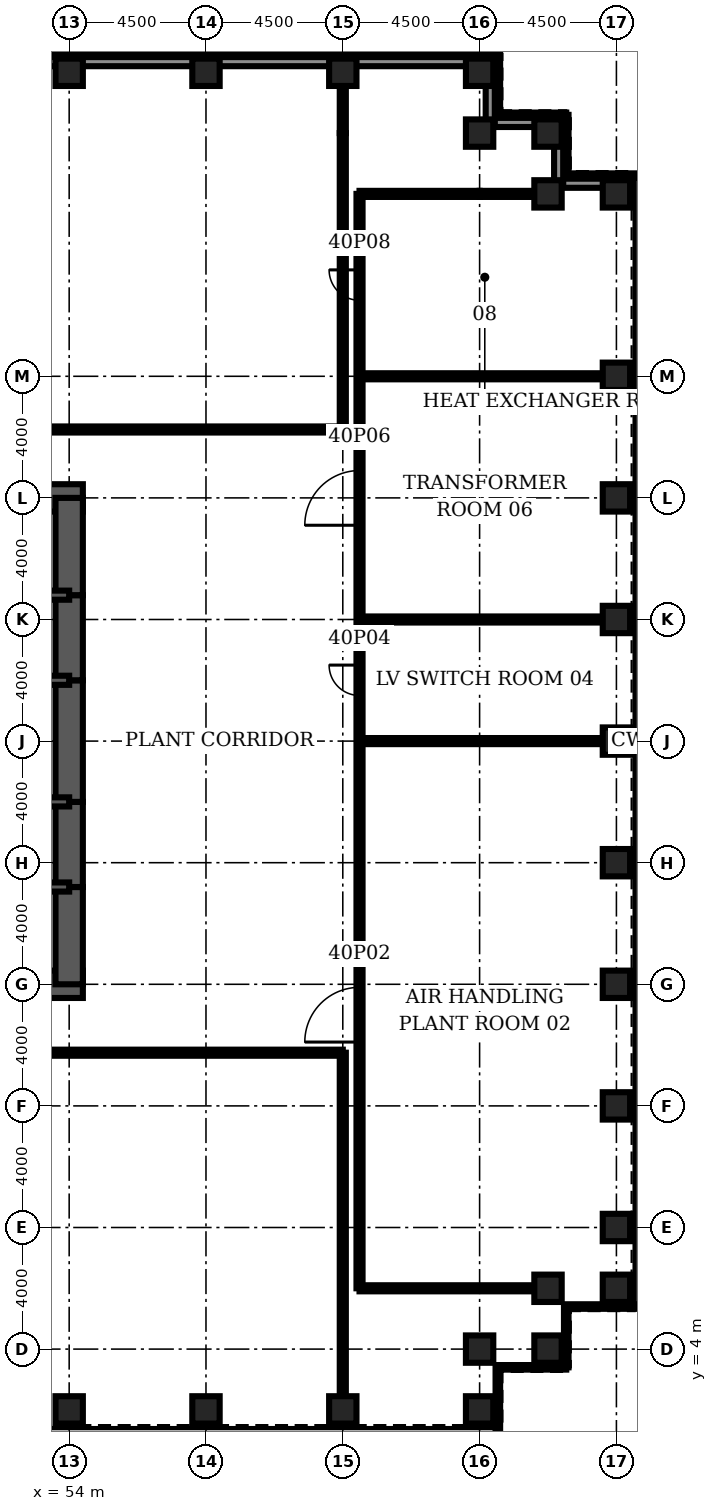
"""IFC4 building model, lengths in metres.
Left out: names, types, materials, properties, quantities, classifications, styles, units other than length and angle.
Written with IfcOpenShell. Run it as: python <this file> out.ifc"""

import sys

from ifc_helpers import new_model, si_unit, direction, frame, frame_2d, origin, origin_2d, place, context, subcontext, project, spatial, rectangle, hollow_rectangle, extrude, element, fill, save


model = new_model("IFC4")
c1 = context("Model", 3, precision=1e-05, world=origin(), true_north=direction((0.0, 1.0)))
c2 = subcontext(c1, "Body", "Model", "MODEL_VIEW")
j1 = project(units=[si_unit("LENGTHUNIT", "METRE"), si_unit("PLANEANGLEUNIT", "RADIAN")], contexts=[c1])
p1 = place(None, origin())
s1 = spatial("IfcSite", under=j1, at=p1, CompositionType="ELEMENT")
p2 = place(p1, origin())
s2 = spatial("IfcBuilding", under=s1, at=p2, CompositionType="ELEMENT")
p3 = place(p2, frame((0.0, 0.0, 180.3)))
s3 = spatial("IfcBuildingStorey", under=s2, at=p3, CompositionType="ELEMENT", Elevation=180.3)
for number, where, z_axis, x_axis in (
    (1, (54.0, 2.0, 0.0), (0.0, 0.0, 1.0), (0.0, 1.0, 0.0)),
    (2, (58.5, 2.0, 0.0), (0.0, 0.0, 1.0), (0.0, 1.0, 0.0)),
    (3, (63.0, 2.0, 0.0), (0.0, 0.0, 1.0), (0.0, 1.0, 0.0)),
    (4, (67.5, 2.0, 0.0), (0.0, 0.0, 1.0), (0.0, 1.0, 0.0)),
    (5, (67.5, 4.0, 0.0), (0.0, 0.0, 1.0), (0.0, 1.0, 0.0)),
    (6, (69.75, 4.0, 0.0), (0.0, 0.0, 1.0), (1.0, 0.0, 0.0)),
    (7, (69.75, 6.0, 0.0), (0.0, 0.0, 1.0), (1.0, 0.0, 0.0)),
    (8, (72.0, 6.0, 0.0), (0.0, 0.0, 1.0), (1.0, 0.0, 0.0)),
    (9, (72.0, 8.0, 0.0), (0.0, 0.0, 1.0), (1.0, 0.0, 0.0)),
    (10, (72.0, 12.0, 0.0), (0.0, 0.0, 1.0), (1.0, 0.0, 0.0)),
    (11, (72.0, 16.0, 0.0), (0.0, 0.0, 1.0), (1.0, 0.0, 0.0)),
    (12, (72.0, 20.0, 0.0), (0.0, 0.0, 1.0), (1.0, 0.0, 0.0)),
    (13, (72.0, 24.0, 0.0), (0.0, 0.0, 1.0), (1.0, 0.0, 0.0)),
    (14, (72.0, 28.0, 0.0), (0.0, 0.0, 1.0), (1.0, 0.0, 0.0)),
    (15, (72.0, 32.0, 0.0), (0.0, 0.0, 1.0), (1.0, 0.0, 0.0)),
    (16, (72.0, 36.0, 0.0), (0.0, 0.0, 1.0), (1.0, 0.0, 0.0)),
):
    element("IfcColumn", number, at=place(p3, frame(where, z_axis=z_axis, x_axis=x_axis)), inside=s3, PredefinedType="COLUMN", context=c2, shape_type="SweptSolid", body=[
        extrude(hollow_rectangle(XDim=0.9, YDim=0.9, WallThickness=0.09, at=origin_2d()), origin(), (0.0, 0.0, 1.0), 5.5),
    ])
for number, where, z_axis, x_axis in (
    (17, (72.0, 41.944, 0.155), (0.0, -0.342, 0.94), (1.0, 0.0, 0.0)),
    (18, (69.75, 41.944, 0.155), (0.0, -0.342, 0.94), (1.0, 0.0, 0.0)),
    (19, (69.75, 43.944, 0.155), (0.0, -0.342, 0.94), (1.0, 0.0, 0.0)),
    (20, (67.5, 43.944, 0.155), (0.0, -0.342, 0.94), (0.0, 0.94, 0.342)),
    (21, (67.5, 45.944, 0.155), (0.0, -0.342, 0.94), (0.0, 0.94, 0.342)),
    (22, (63.0, 45.944, 0.155), (0.0, -0.342, 0.94), (0.0, 0.94, 0.342)),
    (23, (58.5, 45.944, 0.155), (0.0, -0.342, 0.94), (0.0, 0.94, 0.342)),
    (24, (54.0, 45.944, 0.155), (0.0, -0.342, 0.94), (0.0, 0.94, 0.342)),
):
    element("IfcColumn", number, at=place(p3, frame(where, z_axis=z_axis, x_axis=x_axis)), inside=s3, PredefinedType="USERDEFINED", context=c2, shape_type="SweptSolid", body=[
        extrude(hollow_rectangle(XDim=0.9, YDim=0.9, WallThickness=0.09, at=origin_2d()), origin(), (0.0, 0.0, 1.0), 5.522),
    ])
for number, where, z_axis, x_axis in (
    (25, (45.0, 16.0, 0.0), (0.0, 0.0, 1.0), (1.0, 0.0, 0.0)),
    (26, (54.45, 32.0, 0.0), (0.0, 0.0, 1.0), (-1.0, 0.0, 0.0)),
):
    element("IfcWall", number, at=place(p3, frame(where, z_axis=z_axis, x_axis=x_axis)), inside=s3, PredefinedType="SHEAR", context=c2, shape_type="SweptSolid", body=[
        extrude(rectangle(XDim=9.45, YDim=0.9, at=frame_2d((4.725, 0.0))), origin(), (0.0, 0.0, 1.0), 5.5),
    ])
p4 = place(p3, frame((54.0, 16.0, 0.0), z_axis=(0.0, 0.0, 1.0), x_axis=(0.0, 1.0, 0.0)))
e27 = element("IfcWall", 27, at=p4, inside=s3, PredefinedType="SHEAR", context=c2, shape_type="SweptSolid", body=[
    extrude(rectangle(XDim=3.2, YDim=0.9, at=frame_2d((1.6, 0.0))), origin(), (0.0, 0.0, 1.0), 5.5),
])
p5 = place(p3, frame((54.0, 19.2, 0.0), z_axis=(0.0, 0.0, 1.0), x_axis=(0.0, 1.0, 0.0)))
e28 = element("IfcWall", 28, at=p5, inside=s3, PredefinedType="SHEAR", context=c2, shape_type="SweptSolid", body=[
    extrude(rectangle(XDim=2.8, YDim=0.9, at=frame_2d((1.4, 0.0))), origin(), (0.0, 0.0, 1.0), 5.5),
])
p6 = place(p5, frame((0.4, 0.0, 0.0)))
e29 = element("IfcOpeningElement", 29, at=p6, cuts=e28, PredefinedType="OPENING", context=c2, shape_type="SweptSolid", body=[
    extrude(rectangle(XDim=1.8, YDim=2.1, at=frame_2d((0.9, 1.05))), frame((0.0, 0.46, 0.0), z_axis=(0.0, -1.0, 0.0), x_axis=(1.0, 0.0, 0.0)), (0.0, 0.0, 1.0), 0.92),
])
p7 = place(p3, frame((54.0, 22.0, 0.0), z_axis=(0.0, 0.0, 1.0), x_axis=(0.0, 1.0, 0.0)))
e30 = element("IfcWall", 30, at=p7, inside=s3, PredefinedType="SHEAR", context=c2, shape_type="SweptSolid", body=[
    extrude(rectangle(XDim=4.0, YDim=0.9, at=frame_2d((2.0, 0.0))), origin(), (0.0, 0.0, 1.0), 5.5),
])
p8 = place(p3, frame((54.0, 26.0, 0.0), z_axis=(0.0, 0.0, 1.0), x_axis=(0.0, 1.0, 0.0)))
e31 = element("IfcWall", 31, at=p8, inside=s3, PredefinedType="SHEAR", context=c2, shape_type="SweptSolid", body=[
    extrude(rectangle(XDim=2.8, YDim=0.9, at=frame_2d((1.4, 0.0))), origin(), (0.0, 0.0, 1.0), 5.5),
])
p9 = place(p8, frame((0.6, 0.0, 0.0)))
e32 = element("IfcOpeningElement", 32, at=p9, cuts=e31, PredefinedType="OPENING", context=c2, shape_type="SweptSolid", body=[
    extrude(rectangle(XDim=1.8, YDim=2.1, at=frame_2d((0.9, 1.05))), frame((0.0, 0.46, 0.0), z_axis=(0.0, -1.0, 0.0), x_axis=(1.0, 0.0, 0.0)), (0.0, 0.0, 1.0), 0.92),
])
p10 = place(p3, frame((54.0, 28.8, 0.0), z_axis=(0.0, 0.0, 1.0), x_axis=(0.0, 1.0, 0.0)))
e33 = element("IfcWall", 33, at=p10, inside=s3, PredefinedType="SHEAR", context=c2, shape_type="SweptSolid", body=[
    extrude(rectangle(XDim=3.2, YDim=0.9, at=frame_2d((1.6, 0.0))), origin(), (0.0, 0.0, 1.0), 5.5),
])
p11 = place(p3, frame((45.0, 19.2, 0.0), z_axis=(0.0, 0.0, 1.0), x_axis=(1.0, 0.0, 0.0)))
e34 = element("IfcWall", 34, at=p11, inside=s3, PredefinedType="SOLIDWALL", context=c2, shape_type="SweptSolid", body=[
    extrude(rectangle(XDim=9.0, YDim=0.3, at=frame_2d((4.5, 0.0))), origin(), (0.0, 0.0, 1.0), 5.5),
])
p12 = place(p11, frame((7.35, 0.0, 0.0)))
e35 = element("IfcOpeningElement", 35, at=p12, cuts=e34, PredefinedType="OPENING", context=c2, shape_type="SweptSolid", body=[
    extrude(rectangle(XDim=1.0, YDim=2.1, at=frame_2d((0.5, 1.05))), frame((0.0, 0.16, 0.0), z_axis=(0.0, -1.0, 0.0), x_axis=(1.0, 0.0, 0.0)), (0.0, 0.0, 1.0), 0.32),
])
p13 = place(p3, frame((45.0, 28.8, 0.0), z_axis=(0.0, 0.0, 1.0), x_axis=(1.0, 0.0, 0.0)))
e36 = element("IfcWall", 36, at=p13, inside=s3, PredefinedType="SOLIDWALL", context=c2, shape_type="SweptSolid", body=[
    extrude(rectangle(XDim=9.0, YDim=0.3, at=frame_2d((4.5, 0.0))), origin(), (0.0, 0.0, 1.0), 5.5),
])
p14 = place(p13, frame((7.35, 0.0, 0.0)))
e37 = element("IfcOpeningElement", 37, at=p14, cuts=e36, PredefinedType="OPENING", context=c2, shape_type="SweptSolid", body=[
    extrude(rectangle(XDim=1.0, YDim=2.1, at=frame_2d((0.5, 1.05))), frame((0.0, 0.16, 0.0), z_axis=(0.0, -1.0, 0.0), x_axis=(1.0, 0.0, 0.0)), (0.0, 0.0, 1.0), 0.32),
])
p15 = place(p3, frame((48.0, 22.0, 0.0), z_axis=(0.0, 0.0, 1.0), x_axis=(1.0, 0.0, 0.0)))
e38 = element("IfcWall", 38, at=p15, inside=s3, PredefinedType="SOLIDWALL", context=c2, shape_type="SweptSolid", body=[
    extrude(rectangle(XDim=6.0, YDim=0.3, at=frame_2d((3.0, 0.0))), origin(), (0.0, 0.0, 1.0), 5.5),
])
p16 = place(p15, frame((2.0, 0.0, 0.0)))
e39 = element("IfcOpeningElement", 39, at=p16, cuts=e38, PredefinedType="OPENING", context=c2, shape_type="SweptSolid", body=[
    extrude(rectangle(XDim=1.0, YDim=2.1, at=frame_2d((0.5, 1.05))), frame((0.0, 0.16, 0.0), z_axis=(0.0, -1.0, 0.0), x_axis=(1.0, 0.0, 0.0)), (0.0, 0.0, 1.0), 0.32),
])
p17 = place(p15, frame((4.3, 0.0, 0.0)))
e40 = element("IfcOpeningElement", 40, at=p17, cuts=e38, PredefinedType="OPENING", context=c2, shape_type="SweptSolid", body=[
    extrude(rectangle(XDim=1.0, YDim=2.1, at=frame_2d((0.5, 1.05))), frame((0.0, 0.16, 0.0), z_axis=(0.0, -1.0, 0.0), x_axis=(1.0, 0.0, 0.0)), (0.0, 0.0, 1.0), 0.32),
])
p18 = place(p3, frame((48.0, 26.0, 0.0), z_axis=(0.0, 0.0, 1.0), x_axis=(1.0, 0.0, 0.0)))
e41 = element("IfcWall", 41, at=p18, inside=s3, PredefinedType="SOLIDWALL", context=c2, shape_type="SweptSolid", body=[
    extrude(rectangle(XDim=6.0, YDim=0.3, at=frame_2d((3.0, 0.0))), origin(), (0.0, 0.0, 1.0), 5.5),
])
p19 = place(p3, frame((63.55, 6.0, 0.0), z_axis=(0.0, 0.0, 1.0), x_axis=(1.0, 0.0, 0.0)))
e42 = element("IfcWall", 42, at=p19, inside=s3, PredefinedType="PARTITIONING", context=c2, shape_type="SweptSolid", body=[
    extrude(rectangle(XDim=5.75, YDim=0.2, at=frame_2d((2.875, 0.0))), origin(), (0.0, 0.0, 1.0), 5.34),
])
p20 = place(p3, frame((9.0, 13.75, 0.0), z_axis=(0.0, 0.0, 1.0), x_axis=(1.0, 0.0, 0.0)))
e43 = element("IfcWall", 43, at=p20, inside=s3, PredefinedType="PARTITIONING", context=c2, shape_type="SweptSolid", body=[
    extrude(rectangle(XDim=54.0, YDim=0.2, at=frame_2d((27.0, 0.0))), origin(), (0.0, 0.0, 1.0), 5.34),
])
p21 = place(p20, frame((26.1, 0.0, 0.0)))
e44 = element("IfcOpeningElement", 44, at=p21, cuts=e43, PredefinedType="OPENING", context=c2, shape_type="SweptSolid", body=[
    extrude(rectangle(XDim=1.8, YDim=2.1, at=frame_2d((0.9, 1.05))), frame((0.0, 0.11, 0.0), z_axis=(0.0, -1.0, 0.0), x_axis=(1.0, 0.0, 0.0)), (0.0, 0.0, 1.0), 0.22),
])
for number, where, z_axis, x_axis in (
    (45, (63.55, 24.0, 0.0), (0.0, 0.0, 1.0), (1.0, 0.0, 0.0)),
    (46, (63.55, 28.0, 0.0), (0.0, 0.0, 1.0), (1.0, 0.0, 0.0)),
):
    element("IfcWall", number, at=place(p3, frame(where, z_axis=z_axis, x_axis=x_axis)), inside=s3, PredefinedType="PARTITIONING", context=c2, shape_type="SweptSolid", body=[
        extrude(rectangle(XDim=8.0, YDim=0.2, at=frame_2d((4.0, 0.0))), origin(), (0.0, 0.0, 1.0), 5.34),
    ])
p22 = place(p3, frame((9.0, 34.25, 0.0), z_axis=(0.0, 0.0, 1.0), x_axis=(1.0, 0.0, 0.0)))
e47 = element("IfcWall", 47, at=p22, inside=s3, PredefinedType="PARTITIONING", context=c2, shape_type="SweptSolid", body=[
    extrude(rectangle(XDim=54.0, YDim=0.2, at=frame_2d((27.0, 0.0))), origin(), (0.0, 0.0, 1.0), 5.34),
])
p23 = place(p22, frame((26.1, 0.0, 0.0)))
e48 = element("IfcOpeningElement", 48, at=p23, cuts=e47, PredefinedType="OPENING", context=c2, shape_type="SweptSolid", body=[
    extrude(rectangle(XDim=1.8, YDim=2.1, at=frame_2d((0.9, 1.05))), frame((0.0, 0.11, 0.0), z_axis=(0.0, -1.0, 0.0), x_axis=(1.0, 0.0, 0.0)), (0.0, 0.0, 1.0), 0.22),
])
p24 = place(p3, frame((63.55, 36.0, 0.0), z_axis=(0.0, 0.0, 1.0), x_axis=(1.0, 0.0, 0.0)))
e49 = element("IfcWall", 49, at=p24, inside=s3, PredefinedType="PARTITIONING", context=c2, shape_type="SweptSolid", body=[
    extrude(rectangle(XDim=8.0, YDim=0.2, at=frame_2d((4.0, 0.0))), origin(), (0.0, 0.0, 1.0), 5.34),
])
p25 = place(p3, frame((63.55, 42.0, 0.0), z_axis=(0.0, 0.0, 1.0), x_axis=(1.0, 0.0, 0.0)))
e50 = element("IfcWall", 50, at=p25, inside=s3, PredefinedType="PARTITIONING", context=c2, shape_type="SweptSolid", body=[
    extrude(rectangle(XDim=3.95, YDim=0.2, at=frame_2d((1.975, 0.0))), origin(), (0.0, 0.0, 1.0), 5.34),
])
p26 = place(p3, frame((67.5, 42.0, 0.0), z_axis=(0.0, 0.0, 1.0), x_axis=(1.0, 0.0, 0.0)))
e51 = element("IfcWall", 51, at=p26, inside=s3, PredefinedType="PARTITIONING", context=c2, shape_type="SweptSolid", body=[
    extrude(rectangle(XDim=1.8, YDim=0.2, at=frame_2d((0.9, 0.0))), origin(), (0.0, 0.0, 1.0), 4.64),
])
p27 = place(p3, frame((63.0, 2.45, 0.0), z_axis=(0.0, 0.0, 1.0), x_axis=(0.0, 1.0, 0.0)))
e52 = element("IfcWall", 52, at=p27, inside=s3, PredefinedType="PARTITIONING", context=c2, shape_type="SweptSolid", body=[
    extrude(rectangle(XDim=11.3, YDim=0.2, at=frame_2d((5.65, 0.0))), origin(), (0.0, 0.0, 1.0), 5.34),
])
p28 = place(p3, frame((63.0, 34.25, 0.0), z_axis=(0.0, 0.0, 1.0), x_axis=(0.0, 1.0, 0.0)))
e53 = element("IfcWall", 53, at=p28, inside=s3, PredefinedType="PARTITIONING", context=c2, shape_type="SweptSolid", body=[
    extrude(rectangle(XDim=9.75, YDim=0.2, at=frame_2d((4.875, 0.0))), origin(), (0.0, 0.0, 1.0), 5.25),
])
p29 = place(p3, frame((63.0, 44.0, 0.0), z_axis=(0.0, 0.0, 1.0), x_axis=(0.0, 1.0, 0.0)))
e54 = element("IfcWall", 54, at=p29, inside=s3, PredefinedType="PARTITIONING", context=c2, shape_type="SweptSolid", body=[
    extrude(rectangle(XDim=1.55, YDim=0.2, at=frame_2d((0.775, 0.0))), origin(), (0.0, 0.0, 1.0), 4.726),
])
p30 = place(p3, frame((63.55, 6.0, 0.0), z_axis=(0.0, 0.0, 1.0), x_axis=(0.0, 1.0, 0.0)))
e55 = element("IfcWall", 55, at=p30, inside=s3, PredefinedType="PARTITIONING", context=c2, shape_type="SweptSolid", body=[
    extrude(rectangle(XDim=36.0, YDim=0.2, at=frame_2d((18.0, 0.0))), origin(), (0.0, 0.0, 1.0), 5.34),
])
p31 = place(p30, frame((8.1, 0.0, 0.0)))
e56 = element("IfcOpeningElement", 56, at=p31, cuts=e55, PredefinedType="OPENING", context=c2, shape_type="SweptSolid", body=[
    extrude(rectangle(XDim=1.8, YDim=2.1, at=frame_2d((0.9, 1.05))), frame((0.0, 0.11, 0.0), z_axis=(0.0, -1.0, 0.0), x_axis=(1.0, 0.0, 0.0)), (0.0, 0.0, 1.0), 0.22),
])
p32 = place(p30, frame((19.5, 0.0, 0.0)))
e57 = element("IfcOpeningElement", 57, at=p32, cuts=e55, PredefinedType="OPENING", context=c2, shape_type="SweptSolid", body=[
    extrude(rectangle(XDim=1.0, YDim=2.1, at=frame_2d((0.5, 1.05))), frame((0.0, 0.11, 0.0), z_axis=(0.0, -1.0, 0.0), x_axis=(1.0, 0.0, 0.0)), (0.0, 0.0, 1.0), 0.22),
])
p33 = place(p30, frame((25.1, 0.0, 0.0)))
e58 = element("IfcOpeningElement", 58, at=p33, cuts=e55, PredefinedType="OPENING", context=c2, shape_type="SweptSolid", body=[
    extrude(rectangle(XDim=1.8, YDim=2.1, at=frame_2d((0.9, 1.05))), frame((0.0, 0.11, 0.0), z_axis=(0.0, -1.0, 0.0), x_axis=(1.0, 0.0, 0.0)), (0.0, 0.0, 1.0), 0.22),
])
p34 = place(p30, frame((32.5, 0.0, 0.0)))
e59 = element("IfcOpeningElement", 59, at=p34, cuts=e55, PredefinedType="OPENING", context=c2, shape_type="SweptSolid", body=[
    extrude(rectangle(XDim=1.0, YDim=2.1, at=frame_2d((0.5, 1.05))), frame((0.0, 0.11, 0.0), z_axis=(0.0, -1.0, 0.0), x_axis=(1.0, 0.0, 0.0)), (0.0, 0.0, 1.0), 0.22),
])
p35 = place(p3, frame((68.1, 1.4, 0.0), z_axis=(0.0, 0.0, 1.0), x_axis=(0.0, 1.0, 0.0)))
e60 = element("IfcWall", 60, at=p35, inside=s3, PredefinedType="ELEMENTEDWALL", context=c2, shape_type="SweptSolid", body=[
    extrude(rectangle(XDim=2.0, YDim=0.15, at=frame_2d((1.0, 0.0))), origin(), (0.0, 0.0, 1.0), 5.34),
])
p36 = place(p3, frame((68.1, 3.4, 0.0), z_axis=(0.0, 0.0, 1.0), x_axis=(1.0, 0.0, 0.0)))
e61 = element("IfcWall", 61, at=p36, inside=s3, PredefinedType="ELEMENTEDWALL", context=c2, shape_type="SweptSolid", body=[
    extrude(rectangle(XDim=2.25, YDim=0.15, at=frame_2d((1.125, 0.0))), origin(), (0.0, 0.0, 1.0), 5.34),
])
p37 = place(p3, frame((70.35, 3.4, 0.0), z_axis=(0.0, 0.0, 1.0), x_axis=(0.0, 1.0, 0.0)))
e62 = element("IfcWall", 62, at=p37, inside=s3, PredefinedType="ELEMENTEDWALL", context=c2, shape_type="SweptSolid", body=[
    extrude(rectangle(XDim=2.0, YDim=0.15, at=frame_2d((1.0, 0.0))), origin(), (0.0, 0.0, 1.0), 5.34),
])
for number, where, z_axis, x_axis in (
    (63, (70.35, 5.4, 0.0), (0.0, 0.0, 1.0), (1.0, 0.0, 0.0)),
    (64, (72.6, 42.6, 0.0), (0.0, 0.0, 1.0), (-1.0, 0.0, 0.0)),
):
    element("IfcWall", number, at=place(p3, frame(where, z_axis=z_axis, x_axis=x_axis)), inside=s3, PredefinedType="ELEMENTEDWALL", context=c2, shape_type="SweptSolid", body=[
        extrude(rectangle(XDim=2.25, YDim=0.15, at=frame_2d((1.125, 0.0))), origin(), (0.0, 0.0, 1.0), 5.34),
    ])
p38 = place(p3, frame((70.35, 42.6, 0.0), z_axis=(0.0, 0.0, 1.0), x_axis=(0.0, 1.0, 0.0)))
e65 = element("IfcWall", 65, at=p38, inside=s3, PredefinedType="ELEMENTEDWALL", context=c2, shape_type="SweptSolid", body=[
    extrude(rectangle(XDim=2.0, YDim=0.15, at=frame_2d((1.0, 0.0))), origin(), (0.0, 0.0, 1.0), 5.34),
])
p39 = place(p3, frame((70.35, 44.6, 0.0), z_axis=(0.0, 0.0, 1.0), x_axis=(-1.0, 0.0, 0.0)))
e66 = element("IfcWall", 66, at=p39, inside=s3, PredefinedType="ELEMENTEDWALL", context=c2, shape_type="SweptSolid", body=[
    extrude(rectangle(XDim=2.25, YDim=0.15, at=frame_2d((1.125, 0.0))), origin(), (0.0, 0.0, 1.0), 5.34),
])
p40 = place(p3, frame((68.1, 44.6, 0.0), z_axis=(0.0, 0.0, 1.0), x_axis=(0.0, 1.0, 0.0)))
e67 = element("IfcWall", 67, at=p40, inside=s3, PredefinedType="ELEMENTEDWALL", context=c2, shape_type="SweptSolid", body=[
    extrude(rectangle(XDim=2.0, YDim=0.15, at=frame_2d((1.0, 0.0))), origin(), (0.0, 0.0, 1.0), 5.34),
])
p41 = place(p3, frame((72.35, 42.35, 5.5), z_axis=(0.0, 0.0, 1.0), x_axis=(-1.0, 0.0, 0.0)))
e68 = element("IfcWall", 68, at=p41, inside=s3, PredefinedType="PARAPET", context=c2, shape_type="SweptSolid", body=[
    extrude(rectangle(XDim=2.25, YDim=0.3, at=frame_2d((1.125, 0.0))), origin(), (0.0, 0.0, 1.0), 1.1),
])
p42 = place(p3, frame((70.1, 42.35, 5.5), z_axis=(0.0, 0.0, 1.0), x_axis=(0.0, 1.0, 0.0)))
e69 = element("IfcWall", 69, at=p42, inside=s3, PredefinedType="PARAPET", context=c2, shape_type="SweptSolid", body=[
    extrude(rectangle(XDim=2.0, YDim=0.3, at=frame_2d((1.0, 0.0))), origin(), (0.0, 0.0, 1.0), 1.1),
])
p43 = place(p3, frame((70.1, 44.35, 5.5), z_axis=(0.0, 0.0, 1.0), x_axis=(-1.0, 0.0, 0.0)))
e70 = element("IfcWall", 70, at=p43, inside=s3, PredefinedType="PARAPET", context=c2, shape_type="SweptSolid", body=[
    extrude(rectangle(XDim=2.25, YDim=0.3, at=frame_2d((1.125, 0.0))), origin(), (0.0, 0.0, 1.0), 1.1),
])
p44 = place(p3, frame((67.85, 44.35, 5.5), z_axis=(0.0, 0.0, 1.0), x_axis=(0.0, 1.0, 0.0)))
e71 = element("IfcWall", 71, at=p44, inside=s3, PredefinedType="PARAPET", context=c2, shape_type="SweptSolid", body=[
    extrude(rectangle(XDim=2.0, YDim=0.3, at=frame_2d((1.0, 0.0))), origin(), (0.0, 0.0, 1.0), 1.1),
])
p45 = place(p3, frame((67.85, 46.35, 5.5), z_axis=(0.0, 0.0, 1.0), x_axis=(-1.0, 0.0, 0.0)))
e72 = element("IfcWall", 72, at=p45, inside=s3, PredefinedType="PARAPET", context=c2, shape_type="SweptSolid", body=[
    extrude(rectangle(XDim=63.7, YDim=0.3, at=frame_2d((31.85, 0.0))), origin(), (0.0, 0.0, 1.0), 1.1),
])
p46 = place(p31, origin())
e73 = element("IfcDoor", 73, at=p46, inside=s3, OperationType="SINGLE_SWING_LEFT", PredefinedType="DOOR", context=c2, shape_type="SweptSolid", body=[
    extrude(rectangle(XDim=1.8, YDim=2.1, at=frame_2d((0.9, 1.05))), frame((0.0, 0.025, 0.0), z_axis=(0.0, -1.0, 0.0), x_axis=(1.0, 0.0, 0.0)), (0.0, 0.0, 1.0), 0.05),
])
fill(e56, e73)
p47 = place(p32, origin())
e74 = element("IfcDoor", 74, at=p47, inside=s3, OperationType="SINGLE_SWING_RIGHT", PredefinedType="DOOR", context=c2, shape_type="SweptSolid", body=[
    extrude(rectangle(XDim=1.0, YDim=2.1, at=frame_2d((0.5, 1.05))), frame((0.0, 0.025, 0.0), z_axis=(0.0, -1.0, 0.0), x_axis=(1.0, 0.0, 0.0)), (0.0, 0.0, 1.0), 0.05),
])
fill(e57, e74)
p48 = place(p33, origin())
e75 = element("IfcDoor", 75, at=p48, inside=s3, OperationType="SINGLE_SWING_LEFT", PredefinedType="DOOR", context=c2, shape_type="SweptSolid", body=[
    extrude(rectangle(XDim=1.8, YDim=2.1, at=frame_2d((0.9, 1.05))), frame((0.0, 0.025, 0.0), z_axis=(0.0, -1.0, 0.0), x_axis=(1.0, 0.0, 0.0)), (0.0, 0.0, 1.0), 0.05),
])
fill(e58, e75)
p49 = place(p34, origin())
e76 = element("IfcDoor", 76, at=p49, inside=s3, OperationType="SINGLE_SWING_RIGHT", PredefinedType="DOOR", context=c2, shape_type="SweptSolid", body=[
    extrude(rectangle(XDim=1.0, YDim=2.1, at=frame_2d((0.5, 1.05))), frame((0.0, 0.025, 0.0), z_axis=(0.0, -1.0, 0.0), x_axis=(1.0, 0.0, 0.0)), (0.0, 0.0, 1.0), 0.05),
])
fill(e59, e76)
p50 = place(p6, origin())
e77 = element("IfcDoor", 77, at=p50, inside=s3, OperationType="SINGLE_SWING_LEFT", PredefinedType="DOOR", context=c2, shape_type="SweptSolid", body=[
    extrude(rectangle(XDim=1.8, YDim=2.1, at=frame_2d((0.9, 1.05))), frame((0.0, 0.45, 0.0), z_axis=(0.0, -1.0, 0.0), x_axis=(1.0, 0.0, 0.0)), (0.0, 0.0, 1.0), 0.899),
])
fill(e29, e77)
p51 = place(p9, origin())
e78 = element("IfcDoor", 78, at=p51, inside=s3, OperationType="SINGLE_SWING_LEFT", PredefinedType="DOOR", context=c2, shape_type="SweptSolid", body=[
    extrude(rectangle(XDim=1.8, YDim=2.1, at=frame_2d((0.9, 1.05))), frame((0.0, 0.45, 0.0), z_axis=(0.0, -1.0, 0.0), x_axis=(1.0, 0.0, 0.0)), (0.0, 0.0, 1.0), 0.899),
])
fill(e32, e78)
save(model, sys.argv[1])
